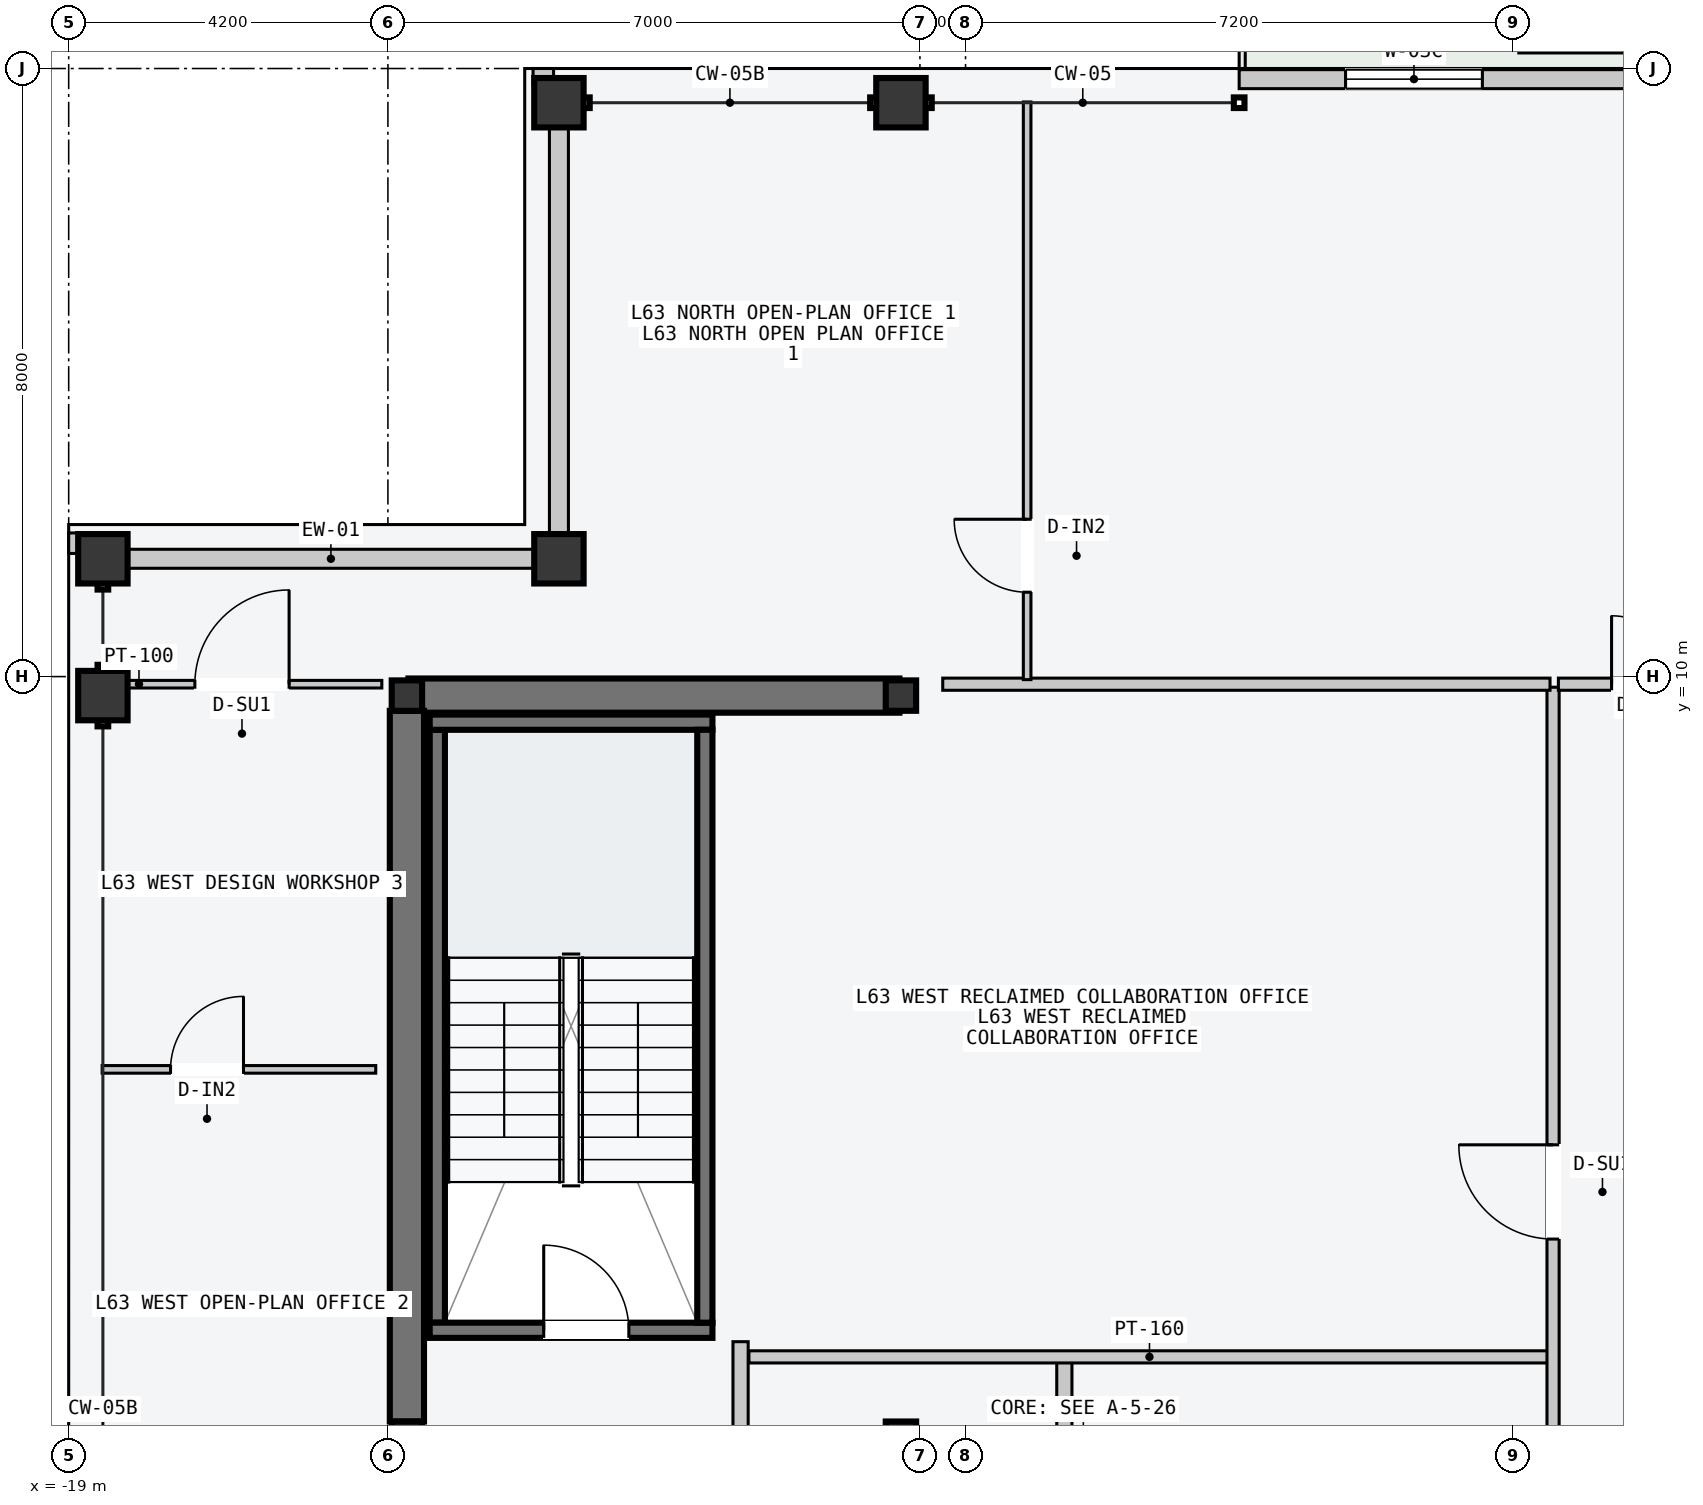
"""IFC4 building model, lengths in metres.
Left out: names, types, materials, properties, quantities, classifications, styles, units other than length and angle.
Written with IfcOpenShell. Run it as: python <this file> out.ifc"""

import sys

from ifc_helpers import new_model, si_unit, direction, frame, frame_2d, origin, origin_2d, place, context, subcontext, project, spatial, rectangle, hollow_rectangle, i_section, extrude, element, fill, save


model = new_model("IFC4")
c1 = context("Model", 3, precision=1e-05, world=origin(), true_north=direction((0.0, 1.0)))
c2 = subcontext(c1, "Body", "Model", "MODEL_VIEW")
j1 = project(units=[si_unit("LENGTHUNIT", "METRE"), si_unit("PLANEANGLEUNIT", "RADIAN")], contexts=[c1])
p1 = place(None, origin())
s1 = spatial("IfcSite", under=j1, at=p1, CompositionType="ELEMENT")
p2 = place(p1, origin())
s2 = spatial("IfcBuilding", under=s1, at=p2, CompositionType="ELEMENT")
p3 = place(p2, frame((0.0, 0.0, 240.0)))
s3 = spatial("IfcBuildingStorey", under=s2, at=p3, CompositionType="ELEMENT", Elevation=240.0)
p4 = place(p3, frame((-14.53, 9.75, -0.2), z_axis=(0.0, 0.0, 1.0), x_axis=(1.0, 0.0, 0.0)))
e1 = element("IfcWall", 1, at=p4, inside=s3, PredefinedType="SHEAR", context=c2, shape_type="SweptSolid", body=[
    extrude(rectangle(XDim=6.46, YDim=0.45, at=frame_2d((3.23, 0.0))), origin(), (0.0, 0.0, 1.0), 3.6),
])
p5 = place(p3, frame((-14.55, 0.2, -0.2), z_axis=(0.0, 0.0, 1.0), x_axis=(0.0, 1.0, 0.0)))
e2 = element("IfcWall", 2, at=p5, inside=s3, PredefinedType="SHEAR", context=c2, shape_type="SweptSolid", body=[
    extrude(rectangle(XDim=9.35, YDim=0.45, at=frame_2d((4.675, 0.0))), origin(), (0.0, 0.0, 1.0), 3.6),
])
p6 = place(p3, frame((-14.15, 1.5, -0.2), z_axis=(0.0, 0.0, 1.0), x_axis=(0.0, 1.0, 0.0)))
e3 = element("IfcWall", 3, at=p6, inside=s3, PredefinedType="SOLIDWALL", context=c2, shape_type="SweptSolid", body=[
    extrude(rectangle(XDim=7.8, YDim=0.2, at=frame_2d((3.9, 0.0))), origin(), (0.0, 0.0, 1.0), 3.6),
])
p7 = place(p3, frame((-14.25, 1.4, -0.2), z_axis=(0.0, 0.0, 1.0), x_axis=(1.0, 0.0, 0.0)))
e4 = element("IfcWall", 4, at=p7, inside=s3, PredefinedType="SOLIDWALL", context=c2, shape_type="SweptSolid", body=[
    extrude(rectangle(XDim=3.72, YDim=0.2, at=frame_2d((1.86, 0.0))), origin(), (0.0, 0.0, 1.0), 3.6),
])
p8 = place(p7, frame((1.5, 0.0, 0.2)))
e5 = element("IfcOpeningElement", 5, at=p8, cuts=e4, PredefinedType="OPENING", context=c2, shape_type="SweptSolid", body=[
    extrude(rectangle(XDim=1.12, YDim=2.18, at=frame_2d((0.56, 1.09))), frame((0.0, 0.11, 0.0), z_axis=(0.0, -1.0, 0.0), x_axis=(1.0, 0.0, 0.0)), (0.0, 0.0, 1.0), 0.22),
])
p9 = place(p3, frame((-14.25, 9.4, -0.2), z_axis=(0.0, 0.0, 1.0), x_axis=(1.0, 0.0, 0.0)))
e6 = element("IfcWall", 6, at=p9, inside=s3, PredefinedType="SOLIDWALL", context=c2, shape_type="SweptSolid", body=[
    extrude(rectangle(XDim=3.72, YDim=0.2, at=frame_2d((1.86, 0.0))), origin(), (0.0, 0.0, 1.0), 3.6),
])
p10 = place(p3, frame((-10.63, 1.5, -0.2), z_axis=(0.0, 0.0, 1.0), x_axis=(0.0, 1.0, 0.0)))
e7 = element("IfcWall", 7, at=p10, inside=s3, PredefinedType="SOLIDWALL", context=c2, shape_type="SweptSolid", body=[
    extrude(rectangle(XDim=7.8, YDim=0.2, at=frame_2d((3.9, 0.0))), origin(), (0.0, 0.0, 1.0), 3.6),
])
for number, where, z_axis, x_axis in (
    (8, (-14.55, 0.0, 0.0), (0.0, 0.0, 1.0), (1.0, 0.0, 0.0)),
    (9, (-14.55, 9.75, 0.0), (0.0, 0.0, 1.0), (1.0, 0.0, 0.0)),
    (10, (-8.05, 0.0, 0.0), (0.0, 0.0, 1.0), (1.0, 0.0, 0.0)),
    (11, (-8.05, 9.75, 0.0), (0.0, 0.0, 1.0), (1.0, 0.0, 0.0)),
):
    element("IfcColumn", number, at=place(p3, frame(where, z_axis=z_axis, x_axis=x_axis)), inside=s3, PredefinedType="COLUMN", context=c2, shape_type="SweptSolid", body=[
        extrude(i_section(OverallWidth=0.4, OverallDepth=0.4, WebThickness=0.013, FlangeThickness=0.021, at=origin_2d()), origin(), (0.0, 0.0, 1.0), 3.6),
    ])
for number, where, z_axis, x_axis in (
    (12, (-12.55, 17.55, 0.0), (0.0, 0.0, 1.0), (1.0, 0.0, 0.0)),
    (13, (-8.05, 17.55, 0.0), (0.0, 0.0, 1.0), (1.0, 0.0, 0.0)),
    (14, (-18.55, 9.75, 0.0), (0.0, 0.0, 1.0), (0.0, 1.0, 0.0)),
    (15, (-18.55, 11.55, 0.0), (0.0, 0.0, 1.0), (0.0, 1.0, 0.0)),
    (16, (-12.55, 11.55, 0.0), (0.0, 0.0, 1.0), (1.0, 0.0, 0.0)),
):
    element("IfcColumn", number, at=place(p3, frame(where, z_axis=z_axis, x_axis=x_axis)), inside=s3, PredefinedType="COLUMN", context=c2, shape_type="SweptSolid", body=[
        extrude(hollow_rectangle(XDim=0.65, YDim=0.65, WallThickness=0.028, at=origin_2d()), origin(), (0.0, 0.0, 1.0), 3.6),
    ])
p11 = place(p3, frame((-3.6, 17.86, 0.0), z_axis=(0.0, 0.0, 1.0), x_axis=(1.0, 0.0, 0.0)))
e17 = element("IfcWall", 17, at=p11, inside=s3, PredefinedType="STANDARD", context=c2, shape_type="SweptSolid", body=[
    extrude(rectangle(XDim=10.8, YDim=0.25, at=frame_2d((5.4, 0.0))), origin(), (0.0, 0.0, 1.0), 3.4),
])
p12 = place(p11, frame((7.4, 0.0, 0.0)))
e18 = element("IfcOpeningElement", 18, at=p12, cuts=e17, PredefinedType="OPENING", context=c2, shape_type="SweptSolid", body=[
    extrude(rectangle(XDim=1.6, YDim=2.2, at=frame_2d((0.8, 1.1))), frame((0.0, 0.135, 0.0), z_axis=(0.0, -1.0, 0.0), x_axis=(1.0, 0.0, 0.0)), (0.0, 0.0, 1.0), 0.27),
])
p13 = place(p11, frame((1.4, 0.0, 0.85)))
e19 = element("IfcOpeningElement", 19, at=p13, cuts=e17, PredefinedType="OPENING", context=c2, shape_type="SweptSolid", body=[
    extrude(rectangle(XDim=1.8, YDim=2.05, at=frame_2d((0.9, 1.025))), frame((0.0, 0.135, 0.0), z_axis=(0.0, -1.0, 0.0), x_axis=(1.0, 0.0, 0.0)), (0.0, 0.0, 1.0), 0.27),
])
for number, where, z_axis, x_axis in (
    (20, (-18.215, 11.55, 0.0), (0.0, 0.0, 1.0), (1.0, 0.0, 0.0)),
    (21, (-12.55, 11.885, 0.0), (0.0, 0.0, 1.0), (0.0, 1.0, 0.0)),
):
    element("IfcWall", number, at=place(p3, frame(where, z_axis=z_axis, x_axis=x_axis)), inside=s3, PredefinedType="STANDARD", context=c2, shape_type="SweptSolid", body=[
        extrude(rectangle(XDim=5.33, YDim=0.25, at=frame_2d((2.665, 0.0))), origin(), (0.0, 0.0, 1.0), 2.85),
    ])
for number, where, z_axis, x_axis in (
    (22, (-12.89, 17.89, 0.0), (0.0, 0.0, 1.0), (1.0, 0.0, 0.0)),
    (23, (-18.89, 11.62, 0.0), (0.0, 0.0, 1.0), (0.0, 1.0, 0.0)),
):
    element("IfcWall", number, at=place(p3, frame(where, z_axis=z_axis, x_axis=x_axis)), inside=s3, PredefinedType="PARAPET", context=c2, shape_type="SweptSolid", body=[
        extrude(rectangle(XDim=0.27, YDim=0.22, at=frame_2d((0.135, 0.0))), origin(), (0.0, 0.0, 1.0), 1.2),
    ])
p14 = place(p3, frame((-5.9, -9.45, 0.0), z_axis=(0.0, 0.0, 1.0), x_axis=(0.0, 1.0, 0.0)))
e24 = element("IfcWall", 24, at=p14, inside=s3, PredefinedType="PARTITIONING", context=c2, shape_type="SweptSolid", body=[
    extrude(rectangle(XDim=10.5, YDim=0.2, at=frame_2d((5.25, 0.0))), origin(), (0.0, 0.0, 1.0), 3.4),
])
p15 = place(p14, frame((3.9, 0.0, 0.0)))
e25 = element("IfcOpeningElement", 25, at=p15, cuts=e24, PredefinedType="OPENING", context=c2, shape_type="SweptSolid", body=[
    extrude(rectangle(XDim=1.5, YDim=2.2, at=frame_2d((0.75, 1.1))), frame((0.0, 0.11, 0.0), z_axis=(0.0, -1.0, 0.0), x_axis=(1.0, 0.0, 0.0)), (0.0, 0.0, 1.0), 0.22),
])
p16 = place(p3, frame((-10.16, -2.55, 0.0), z_axis=(0.0, 0.0, 1.0), x_axis=(0.0, 1.0, 0.0)))
e26 = element("IfcWall", 26, at=p16, inside=s3, PredefinedType="PARTITIONING", context=c2, shape_type="SweptSolid", body=[
    extrude(rectangle(XDim=3.8, YDim=0.2, at=frame_2d((1.9, 0.0))), origin(), (0.0, 0.0, 1.0), 3.4),
])
p17 = place(p16, frame((1.3, 0.0, 0.0)))
e27 = element("IfcOpeningElement", 27, at=p17, cuts=e26, PredefinedType="OPENING", context=c2, shape_type="SweptSolid", body=[
    extrude(rectangle(XDim=1.1, YDim=2.15, at=frame_2d((0.55, 1.075))), frame((0.0, 0.11, 0.0), z_axis=(0.0, -1.0, 0.0), x_axis=(1.0, 0.0, 0.0)), (0.0, 0.0, 1.0), 0.22),
])
p18 = place(p3, frame((-10.05, 1.05, 0.0), z_axis=(0.0, 0.0, 1.0), x_axis=(1.0, 0.0, 0.0)))
e28 = element("IfcWall", 28, at=p18, inside=s3, PredefinedType="PARTITIONING", context=c2, shape_type="SweptSolid", body=[
    extrude(rectangle(XDim=10.54, YDim=0.16, at=frame_2d((5.27, 0.0))), origin(), (0.0, 0.0, 1.0), 3.4),
])
p19 = place(p3, frame((0.53, -3.5, 0.0), z_axis=(0.0, 0.0, 1.0), x_axis=(0.0, 1.0, 0.0)))
e29 = element("IfcWall", 29, at=p19, inside=s3, PredefinedType="PARTITIONING", context=c2, shape_type="SweptSolid", body=[
    extrude(rectangle(XDim=13.36, YDim=0.16, at=frame_2d((6.68, 0.0))), origin(), (0.0, 0.0, 1.0), 3.4),
])
p20 = place(p19, frame((6.1, 0.0, 0.0)))
e30 = element("IfcOpeningElement", 30, at=p20, cuts=e29, PredefinedType="OPENING", context=c2, shape_type="SweptSolid", body=[
    extrude(rectangle(XDim=1.24, YDim=2.24, at=frame_2d((0.62, 1.12))), frame((0.0, 0.09, 0.0), z_axis=(0.0, -1.0, 0.0), x_axis=(1.0, 0.0, 0.0)), (0.0, 0.0, 1.0), 0.18),
])
p21 = place(p19, frame((1.6, 0.0, 0.0)))
e31 = element("IfcOpeningElement", 31, at=p21, cuts=e29, PredefinedType="OPENING", context=c2, shape_type="SweptSolid", body=[
    extrude(rectangle(XDim=0.96, YDim=2.18, at=frame_2d((0.48, 1.09))), frame((0.0, 0.09, 0.0), z_axis=(0.0, -1.0, 0.0), x_axis=(1.0, 0.0, 0.0)), (0.0, 0.0, 1.0), 0.18),
])
p22 = place(p3, frame((-7.5, 9.9, 0.0), z_axis=(0.0, 0.0, 1.0), x_axis=(1.0, 0.0, 0.0)))
e32 = element("IfcWall", 32, at=p22, inside=s3, PredefinedType="PARTITIONING", context=c2, shape_type="SweptSolid", body=[
    extrude(rectangle(XDim=7.99, YDim=0.16, at=frame_2d((3.995, 0.0))), origin(), (0.0, 0.0, 1.0), 3.4),
])
p23 = place(p3, frame((-6.39, 9.96, 0.0), z_axis=(0.0, 0.0, 1.0), x_axis=(0.0, 1.0, 0.0)))
e33 = element("IfcWall", 33, at=p23, inside=s3, PredefinedType="PARTITIONING", context=c2, shape_type="SweptSolid", body=[
    extrude(rectangle(XDim=7.6, YDim=0.1, at=frame_2d((3.8, 0.0))), origin(), (0.0, 0.0, 1.0), 3.4),
])
p24 = place(p23, frame((1.15, 0.0, 0.0)))
e34 = element("IfcOpeningElement", 34, at=p24, cuts=e33, PredefinedType="OPENING", context=c2, shape_type="SweptSolid", body=[
    extrude(rectangle(XDim=0.96, YDim=2.18, at=frame_2d((0.48, 1.09))), frame((0.0, 0.06, 0.0), z_axis=(0.0, -1.0, 0.0), x_axis=(1.0, 0.0, 0.0)), (0.0, 0.0, 1.0), 0.12),
])
p25 = place(p3, frame((0.6, 9.9, 0.0), z_axis=(0.0, 0.0, 1.0), x_axis=(1.0, 0.0, 0.0)))
e35 = element("IfcWall", 35, at=p25, inside=s3, PredefinedType="PARTITIONING", context=c2, shape_type="SweptSolid", body=[
    extrude(rectangle(XDim=2.3, YDim=0.16, at=frame_2d((1.15, 0.0))), origin(), (0.0, 0.0, 1.0), 3.4),
])
p26 = place(p25, frame((0.7, 0.0, 0.0)))
e36 = element("IfcOpeningElement", 36, at=p26, cuts=e35, PredefinedType="OPENING", context=c2, shape_type="SweptSolid", body=[
    extrude(rectangle(XDim=0.9, YDim=2.15, at=frame_2d((0.45, 1.075))), frame((0.0, 0.09, 0.0), z_axis=(0.0, -1.0, 0.0), x_axis=(1.0, 0.0, 0.0)), (0.0, 0.0, 1.0), 0.18),
])
p27 = place(p3, frame((-18.56, 9.9, 0.0), z_axis=(0.0, 0.0, 1.0), x_axis=(1.0, 0.0, 0.0)))
e37 = element("IfcWall", 37, at=p27, inside=s3, PredefinedType="PARTITIONING", context=c2, shape_type="SweptSolid", body=[
    extrude(rectangle(XDim=3.68, YDim=0.1, at=frame_2d((1.84, 0.0))), origin(), (0.0, 0.0, 1.0), 3.4),
])
p28 = place(p27, frame((1.22, 0.0, 0.0)))
e38 = element("IfcOpeningElement", 38, at=p28, cuts=e37, PredefinedType="OPENING", context=c2, shape_type="SweptSolid", body=[
    extrude(rectangle(XDim=1.24, YDim=2.24, at=frame_2d((0.62, 1.12))), frame((0.0, 0.06, 0.0), z_axis=(0.0, -1.0, 0.0), x_axis=(1.0, 0.0, 0.0)), (0.0, 0.0, 1.0), 0.12),
])
p29 = place(p3, frame((-18.56, 4.833, 0.0), z_axis=(0.0, 0.0, 1.0), x_axis=(1.0, 0.0, 0.0)))
e39 = element("IfcWall", 39, at=p29, inside=s3, PredefinedType="PARTITIONING", context=c2, shape_type="SweptSolid", body=[
    extrude(rectangle(XDim=3.6, YDim=0.1, at=frame_2d((1.8, 0.0))), origin(), (0.0, 0.0, 1.0), 3.4),
])
p30 = place(p29, frame((0.9, 0.0, 0.0)))
e40 = element("IfcOpeningElement", 40, at=p30, cuts=e39, PredefinedType="OPENING", context=c2, shape_type="SweptSolid", body=[
    extrude(rectangle(XDim=0.96, YDim=2.18, at=frame_2d((0.48, 1.09))), frame((0.0, 0.06, 0.0), z_axis=(0.0, -1.0, 0.0), x_axis=(1.0, 0.0, 0.0)), (0.0, 0.0, 1.0), 0.12),
])
p31 = place(p8, origin())
e41 = element("IfcDoor", 41, at=p31, inside=s3, OperationType="SINGLE_SWING_LEFT", PredefinedType="DOOR", context=c2, shape_type="SweptSolid", body=[
    extrude(rectangle(XDim=1.12, YDim=2.18, at=frame_2d((0.56, 1.09))), frame((0.0, 0.025, 0.0), z_axis=(0.0, -1.0, 0.0), x_axis=(1.0, 0.0, 0.0)), (0.0, 0.0, 1.0), 0.05),
])
fill(e5, e41)
p32 = place(p13, origin())
e42 = element("IfcWindow", 42, at=p32, inside=s3, PartitioningType="SINGLE_PANEL", PredefinedType="WINDOW", context=c2, shape_type="SweptSolid", body=[
    extrude(rectangle(XDim=1.8, YDim=2.05, at=frame_2d((0.9, 1.025))), frame((0.0, 0.03, 0.0), z_axis=(0.0, -1.0, 0.0), x_axis=(1.0, 0.0, 0.0)), (0.0, 0.0, 1.0), 0.06),
])
fill(e19, e42)
p33 = place(p20, origin())
e43 = element("IfcDoor", 43, at=p33, inside=s3, OperationType="SINGLE_SWING_RIGHT", PredefinedType="DOOR", context=c2, shape_type="SweptSolid", body=[
    extrude(rectangle(XDim=1.24, YDim=2.24, at=frame_2d((0.62, 1.12))), frame((0.0, 0.025, 0.0), z_axis=(0.0, -1.0, 0.0), x_axis=(1.0, 0.0, 0.0)), (0.0, 0.0, 1.0), 0.05),
])
fill(e30, e43)
p34 = place(p24, origin())
e44 = element("IfcDoor", 44, at=p34, inside=s3, OperationType="SINGLE_SWING_RIGHT", PredefinedType="DOOR", context=c2, shape_type="SweptSolid", body=[
    extrude(rectangle(XDim=0.96, YDim=2.18, at=frame_2d((0.48, 1.09))), frame((0.0, 0.025, 0.0), z_axis=(0.0, -1.0, 0.0), x_axis=(1.0, 0.0, 0.0)), (0.0, 0.0, 1.0), 0.05),
])
fill(e34, e44)
p35 = place(p26, origin())
e45 = element("IfcDoor", 45, at=p35, inside=s3, OperationType="SINGLE_SWING_LEFT", PredefinedType="DOOR", context=c2, shape_type="SweptSolid", body=[
    extrude(rectangle(XDim=0.9, YDim=2.15, at=frame_2d((0.45, 1.075))), frame((0.0, 0.025, 0.0), z_axis=(0.0, -1.0, 0.0), x_axis=(1.0, 0.0, 0.0)), (0.0, 0.0, 1.0), 0.05),
])
fill(e36, e45)
p36 = place(p28, origin())
e46 = element("IfcDoor", 46, at=p36, inside=s3, OperationType="SINGLE_SWING_RIGHT", PredefinedType="DOOR", context=c2, shape_type="SweptSolid", body=[
    extrude(rectangle(XDim=1.24, YDim=2.24, at=frame_2d((0.62, 1.12))), frame((0.0, 0.025, 0.0), z_axis=(0.0, -1.0, 0.0), x_axis=(1.0, 0.0, 0.0)), (0.0, 0.0, 1.0), 0.05),
])
fill(e38, e46)
p37 = place(p30, origin())
e47 = element("IfcDoor", 47, at=p37, inside=s3, OperationType="SINGLE_SWING_RIGHT", PredefinedType="DOOR", context=c2, shape_type="SweptSolid", body=[
    extrude(rectangle(XDim=0.96, YDim=2.18, at=frame_2d((0.48, 1.09))), frame((0.0, 0.025, 0.0), z_axis=(0.0, -1.0, 0.0), x_axis=(1.0, 0.0, 0.0)), (0.0, 0.0, 1.0), 0.05),
])
fill(e40, e47)
save(model, sys.argv[1])
